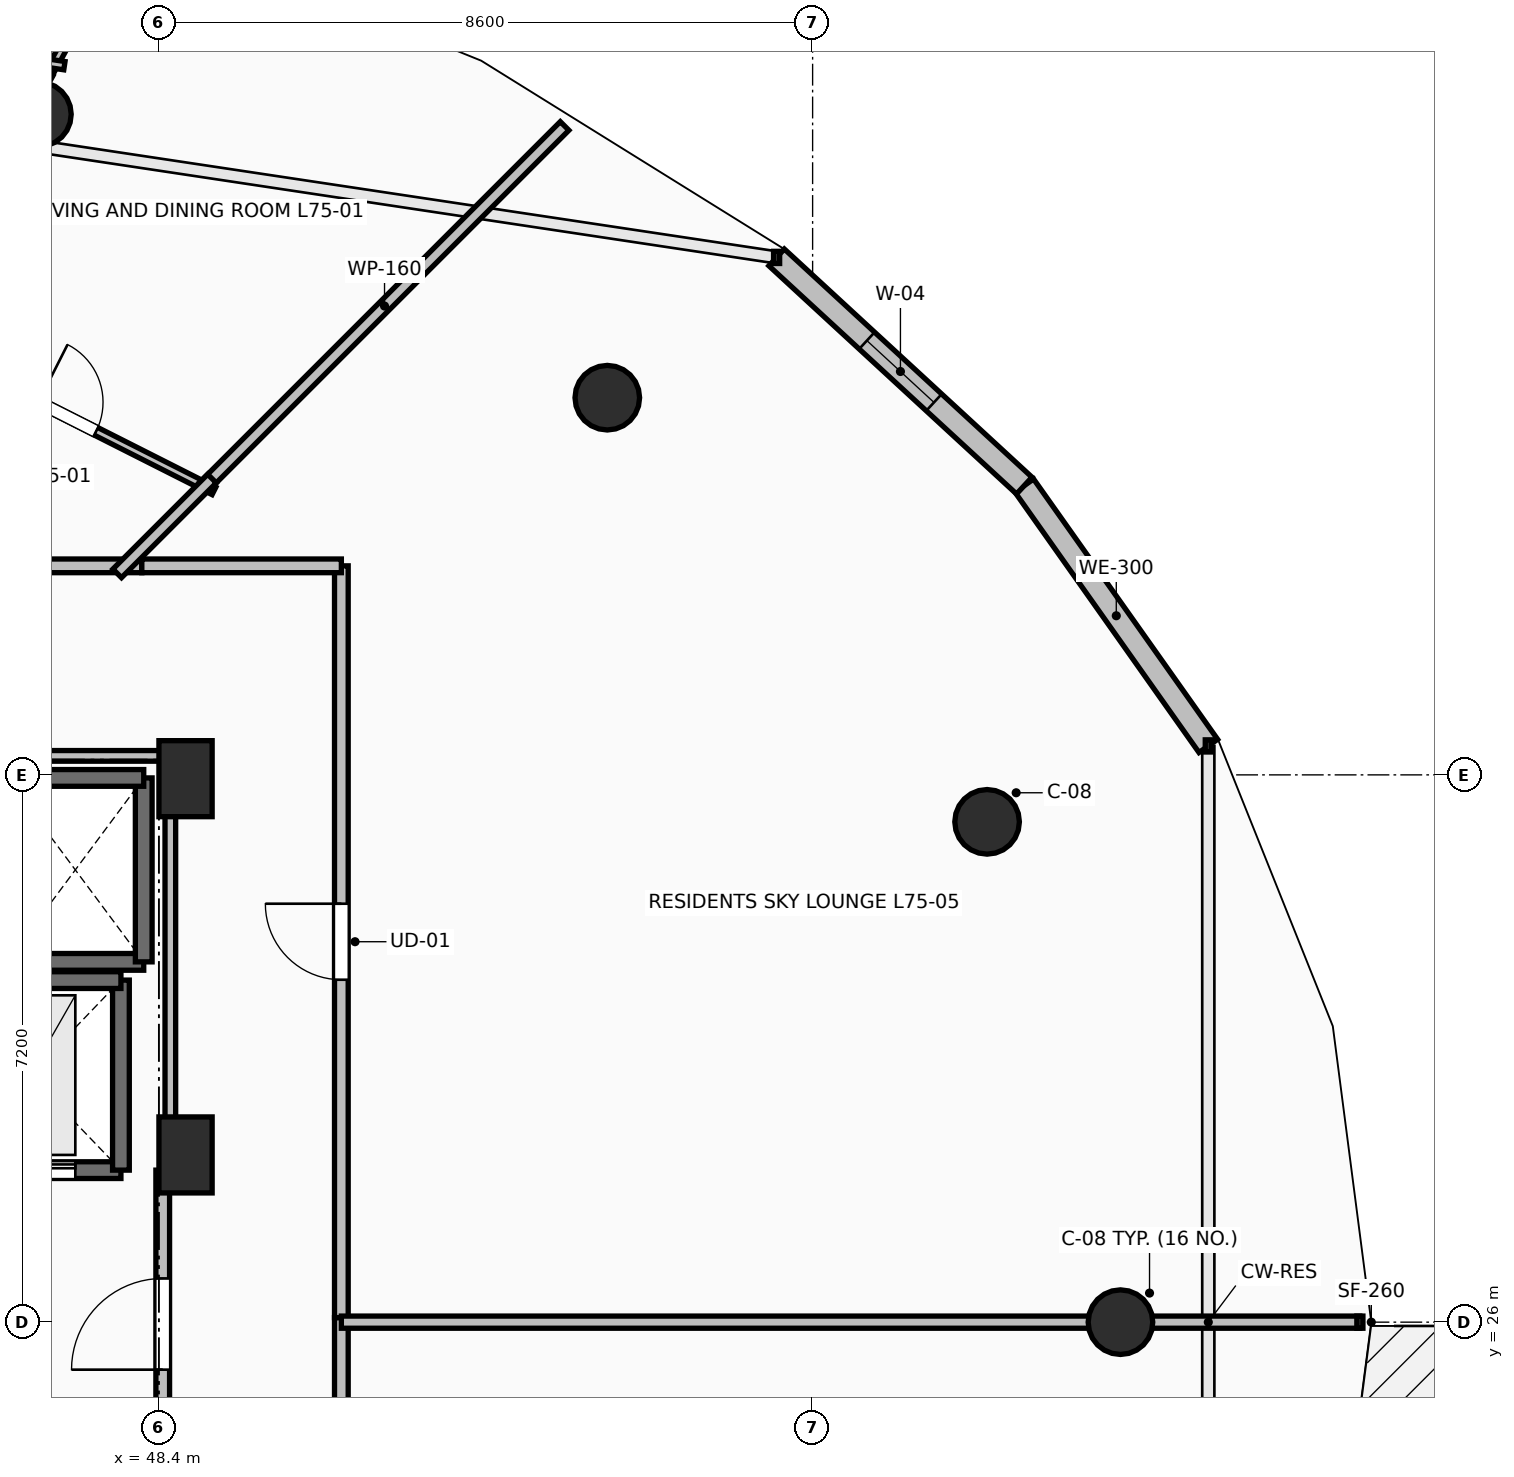
"""IFC4 building model, lengths in metres.
Left out: names, types, materials, properties, quantities, classifications, styles, units other than length and angle.
Written with IfcOpenShell. Run it as: python <this file> out.ifc"""

import sys

from ifc_helpers import new_model, si_unit, direction, frame, frame_2d, origin, origin_2d, place, context, subcontext, project, spatial, rectangle, circle, extrude, element, fill, save


model = new_model("IFC4")
c1 = context("Model", 3, precision=1e-05, world=origin(), true_north=direction((0.0, 1.0)))
c2 = subcontext(c1, "Body", "Model", "MODEL_VIEW")
j1 = project(units=[si_unit("LENGTHUNIT", "METRE"), si_unit("PLANEANGLEUNIT", "RADIAN")], contexts=[c1])
p1 = place(None, origin())
s1 = spatial("IfcSite", under=j1, at=p1, CompositionType="ELEMENT")
p2 = place(p1, origin())
s2 = spatial("IfcBuilding", under=s1, at=p2, CompositionType="ELEMENT")
p3 = place(p2, frame((0.0, 0.0, 276.85)))
s3 = spatial("IfcBuildingStorey", under=s2, at=p3, CompositionType="ELEMENT", Elevation=276.85)
for number, where, z_axis, x_axis in (
    (1, (61.05, 26.0, 0.0), (0.0, 0.0, 1.0), (1.0, 0.0, 0.0)),
    (2, (59.295, 32.582, 0.0), (0.0, 0.0, 1.0), (0.924, 0.383, 0.0)),
    (3, (54.299, 38.162, 0.0), (0.0, 0.0, 1.0), (0.707, 0.707, 0.0)),
    (4, (46.821, 41.891, 0.0), (0.0, 0.0, 1.0), (0.383, 0.924, 0.0)),
):
    element("IfcColumn", number, at=place(p3, frame(where, z_axis=z_axis, x_axis=x_axis)), inside=s3, PredefinedType="COLUMN", context=c2, shape_type="SweptSolid", body=[
        extrude(circle(Radius=0.425, at=origin_2d()), origin(), (0.0, 0.0, 1.0), 3.55),
    ])
for number, where, z_axis, x_axis in (
    (5, (48.75, 33.15, 0.0), (0.0, 0.0, 1.0), (1.0, 0.0, 0.0)),
    (6, (48.75, 28.2, 0.0), (0.0, 0.0, 1.0), (1.0, 0.0, 0.0)),
):
    element("IfcColumn", number, at=place(p3, frame(where, z_axis=z_axis, x_axis=x_axis)), inside=s3, PredefinedType="PILASTER", context=c2, shape_type="SweptSolid", body=[
        extrude(rectangle(XDim=0.7, YDim=1.0, at=origin_2d()), origin(), (0.0, 0.0, 1.0), 3.55),
    ])
p4 = place(p3, frame((62.206, 33.581, 0.0), z_axis=(0.0, 0.0, 1.0), x_axis=(-0.577261247247, 0.816559521668, 0.0)))
e7 = element("IfcWall", 7, at=p4, inside=s3, PredefinedType="STANDARD", context=c2, shape_type="SweptSolid", body=[
    extrude(rectangle(XDim=4.194, YDim=0.3, at=frame_2d((2.097, 0.0))), origin(), (0.0, 0.0, 1.0), 3.19),
])
p5 = place(p3, frame((59.784, 37.006, 0.0), z_axis=(0.0, 0.0, 1.0), x_axis=(-0.735445373611, 0.677584018727, 0.0)))
e8 = element("IfcWall", 8, at=p5, inside=s3, PredefinedType="STANDARD", context=c2, shape_type="SweptSolid", body=[
    extrude(rectangle(XDim=4.43, YDim=0.3, at=frame_2d((2.215, 0.0))), origin(), (0.0, 0.0, 1.0), 3.19),
])
p6 = place(p5, frame((1.615, 0.0, 0.85)))
e9 = element("IfcOpeningElement", 9, at=p6, cuts=e8, PredefinedType="OPENING", context=c2, shape_type="SweptSolid", body=[
    extrude(rectangle(XDim=1.2, YDim=2.1, at=frame_2d((0.6, 1.05))), frame((0.0, 0.165, 0.0), z_axis=(0.0, -1.0, 0.0), x_axis=(1.0, 0.0, 0.0)), (0.0, 0.0, 1.0), 0.33),
])
p7 = place(p3, frame((46.4, 30.74, 0.0), z_axis=(0.0, 0.0, 1.0), x_axis=(1.0, 0.0, 0.0)))
e10 = element("IfcWall", 10, at=p7, inside=s3, PredefinedType="SOLIDWALL", context=c2, shape_type="SweptSolid", body=[
    extrude(rectangle(XDim=1.8, YDim=0.22, at=frame_2d((0.9, 0.0))), origin(), (0.0, 0.0, 1.0), 3.19),
])
p8 = place(p3, frame((48.2, 30.74, 0.0), z_axis=(0.0, 0.0, 1.0), x_axis=(0.0, 1.0, 0.0)))
e11 = element("IfcWall", 11, at=p8, inside=s3, PredefinedType="SOLIDWALL", context=c2, shape_type="SweptSolid", body=[
    extrude(rectangle(XDim=2.42, YDim=0.22, at=frame_2d((1.21, 0.0))), origin(), (0.0, 0.0, 1.0), 3.19),
])
p9 = place(p3, frame((48.2, 33.16, 0.0), z_axis=(0.0, 0.0, 1.0), x_axis=(-1.0, 0.0, 0.0)))
e12 = element("IfcWall", 12, at=p9, inside=s3, PredefinedType="SOLIDWALL", context=c2, shape_type="SweptSolid", body=[
    extrude(rectangle(XDim=1.8, YDim=0.22, at=frame_2d((0.9, 0.0))), origin(), (0.0, 0.0, 1.0), 3.19),
])
p10 = place(p3, frame((45.5, 28.0, 0.0), z_axis=(0.0, 0.0, 1.0), x_axis=(1.0, 0.0, 0.0)))
e13 = element("IfcWall", 13, at=p10, inside=s3, PredefinedType="SHEAR", context=c2, shape_type="SweptSolid", body=[
    extrude(rectangle(XDim=2.4, YDim=0.22, at=frame_2d((1.2, 0.0))), origin(), (0.0, 0.0, 1.0), 3.19),
])
p11 = place(p10, frame((0.6, 0.0, 0.0)))
e14 = element("IfcOpeningElement", 14, at=p11, cuts=e13, PredefinedType="OPENING", context=c2, shape_type="SweptSolid", body=[
    extrude(rectangle(XDim=1.2, YDim=2.2, at=frame_2d((0.6, 1.1))), frame((0.0, 0.125, 0.0), z_axis=(0.0, -1.0, 0.0), x_axis=(1.0, 0.0, 0.0)), (0.0, 0.0, 1.0), 0.25),
])
p12 = place(p3, frame((47.9, 28.0, 0.0), z_axis=(0.0, 0.0, 1.0), x_axis=(0.0, 1.0, 0.0)))
e15 = element("IfcWall", 15, at=p12, inside=s3, PredefinedType="SHEAR", context=c2, shape_type="SweptSolid", body=[
    extrude(rectangle(XDim=2.5, YDim=0.22, at=frame_2d((1.25, 0.0))), origin(), (0.0, 0.0, 1.0), 3.19),
])
p13 = place(p3, frame((47.9, 30.5, 0.0), z_axis=(0.0, 0.0, 1.0), x_axis=(-1.0, 0.0, 0.0)))
e16 = element("IfcWall", 16, at=p13, inside=s3, PredefinedType="SHEAR", context=c2, shape_type="SweptSolid", body=[
    extrude(rectangle(XDim=2.4, YDim=0.22, at=frame_2d((1.2, 0.0))), origin(), (0.0, 0.0, 1.0), 3.19),
])
p14 = place(p3, frame((48.45, 23.95, 0.0), z_axis=(0.0, 0.0, 1.0), x_axis=(0.0, 1.0, 0.0)))
e17 = element("IfcWall", 17, at=p14, inside=s3, PredefinedType="PARTITIONING", context=c2, shape_type="SweptSolid", body=[
    extrude(rectangle(XDim=4.05, YDim=0.18, at=frame_2d((2.025, 0.0))), origin(), (0.0, 0.0, 1.0), 3.19),
])
p15 = place(p14, frame((1.425, 0.0, 0.0)))
e18 = element("IfcOpeningElement", 18, at=p15, cuts=e17, PredefinedType="OPENING", context=c2, shape_type="SweptSolid", body=[
    extrude(rectangle(XDim=1.2, YDim=2.15, at=frame_2d((0.6, 1.075))), frame((0.0, 0.105, 0.0), z_axis=(0.0, -1.0, 0.0), x_axis=(1.0, 0.0, 0.0)), (0.0, 0.0, 1.0), 0.21),
])
p16 = place(p3, frame((48.175, 35.95, 0.0), z_axis=(0.0, 0.0, 1.0), x_axis=(-1.0, 0.0, 0.0)))
e19 = element("IfcWall", 19, at=p16, inside=s3, PredefinedType="PARTITIONING", context=c2, shape_type="SweptSolid", body=[
    extrude(rectangle(XDim=4.512, YDim=0.18, at=frame_2d((2.256, 0.0))), origin(), (0.0, 0.0, 1.0), 2.382),
])
p17 = place(p3, frame((50.8, 14.05, 0.0), z_axis=(0.0, 0.0, 1.0), x_axis=(0.0, 1.0, 0.0)))
e20 = element("IfcWall", 20, at=p17, inside=s3, PredefinedType="PARTITIONING", context=c2, shape_type="SweptSolid", body=[
    extrude(rectangle(XDim=12.01, YDim=0.18, at=frame_2d((6.005, 0.0))), origin(), (0.0, 0.0, 1.0), 2.382),
])
p18 = place(p17, frame((5.505, 0.0, 0.0)))
e21 = element("IfcOpeningElement", 21, at=p18, cuts=e20, PredefinedType="OPENING", context=c2, shape_type="SweptSolid", body=[
    extrude(rectangle(XDim=1.0, YDim=2.15, at=frame_2d((0.5, 1.075))), frame((0.0, 0.105, 0.0), z_axis=(0.0, -1.0, 0.0), x_axis=(1.0, 0.0, 0.0)), (0.0, 0.0, 1.0), 0.21),
])
p19 = place(p3, frame((50.8, 26.06, 0.0), z_axis=(0.0, 0.0, 1.0), x_axis=(0.0, 1.0, 0.0)))
e22 = element("IfcWall", 22, at=p19, inside=s3, PredefinedType="PARTITIONING", context=c2, shape_type="SweptSolid", body=[
    extrude(rectangle(XDim=9.89, YDim=0.18, at=frame_2d((4.945, 0.0))), origin(), (0.0, 0.0, 1.0), 2.382),
])
p20 = place(p19, frame((4.445, 0.0, 0.0)))
e23 = element("IfcOpeningElement", 23, at=p20, cuts=e22, PredefinedType="OPENING", context=c2, shape_type="SweptSolid", body=[
    extrude(rectangle(XDim=1.0, YDim=2.15, at=frame_2d((0.5, 1.075))), frame((0.0, 0.105, 0.0), z_axis=(0.0, -1.0, 0.0), x_axis=(1.0, 0.0, 0.0)), (0.0, 0.0, 1.0), 0.21),
])
p21 = place(p3, frame((50.8, 35.95, 0.0), z_axis=(0.0, 0.0, 1.0), x_axis=(-1.0, 0.0, 0.0)))
e24 = element("IfcWall", 24, at=p21, inside=s3, PredefinedType="PARTITIONING", context=c2, shape_type="SweptSolid", body=[
    extrude(rectangle(XDim=2.625, YDim=0.18, at=frame_2d((1.312, 0.0))), origin(), (0.0, 0.0, 1.0), 2.382),
])
p22 = place(p3, frame((45.264, 38.886, 0.0), z_axis=(0.0, 0.0, 1.0), x_axis=(0.892556527512, -0.450935522216, 0.0)))
e25 = element("IfcWall", 25, at=p22, inside=s3, PredefinedType="PARTITIONING", context=c2, shape_type="SweptSolid", body=[
    extrude(rectangle(XDim=4.325, YDim=0.11, at=frame_2d((2.162, 0.0))), origin(), (0.0, 0.0, 1.0), 2.382),
])
p23 = place(p22, frame((1.737, 0.0, 0.0)))
e26 = element("IfcOpeningElement", 26, at=p23, cuts=e25, PredefinedType="OPENING", context=c2, shape_type="SweptSolid", body=[
    extrude(rectangle(XDim=0.85, YDim=2.1, at=frame_2d((0.425, 1.05))), frame((0.0, 0.07, 0.0), z_axis=(0.0, -1.0, 0.0), x_axis=(1.0, 0.0, 0.0)), (0.0, 0.0, 1.0), 0.14),
])
p24 = place(p3, frame((48.044, 44.434, 0.0), z_axis=(0.0, 0.0, 1.0), x_axis=(-0.478485169604, -0.878095634011, 0.0)))
e27 = element("IfcWall", 27, at=p24, inside=s3, PredefinedType="PARTITIONING", context=c2, shape_type="SweptSolid", body=[
    extrude(rectangle(XDim=2.284, YDim=0.11, at=frame_2d((1.142, 0.0))), origin(), (0.0, 0.0, 1.0), 3.19),
])
p25 = place(p24, frame((0.692, 0.0, 0.0)))
e28 = element("IfcOpeningElement", 28, at=p25, cuts=e27, PredefinedType="OPENING", context=c2, shape_type="SweptSolid", body=[
    extrude(rectangle(XDim=0.9, YDim=2.1, at=frame_2d((0.45, 1.05))), frame((0.0, 0.07, 0.0), z_axis=(0.0, -1.0, 0.0), x_axis=(1.0, 0.0, 0.0)), (0.0, 0.0, 1.0), 0.14),
])
p26 = place(p3, frame((46.951, 42.428, 0.0), z_axis=(0.0, 0.0, 1.0), x_axis=(-0.478536562944, -0.878067627194, 0.0)))
e29 = element("IfcWall", 29, at=p26, inside=s3, PredefinedType="PARTITIONING", context=c2, shape_type="SweptSolid", body=[
    extrude(rectangle(XDim=1.897, YDim=0.125, at=frame_2d((0.949, 0.0))), origin(), (0.0, 0.0, 1.0), 3.19),
])
p27 = place(p3, frame((48.999, 36.999, 0.0), z_axis=(0.0, 0.0, 1.0), x_axis=(0.707106781187, 0.707106781187, 0.0)))
e30 = element("IfcWall", 30, at=p27, inside=s3, PredefinedType="PARTITIONING", context=c2, shape_type="SweptSolid", body=[
    extrude(rectangle(XDim=6.701, YDim=0.16, at=frame_2d((3.35, 0.0))), origin(), (0.0, 0.0, 1.0), 2.774),
])
p28 = place(p3, frame((47.851, 35.851, 0.0), z_axis=(0.0, 0.0, 1.0), x_axis=(0.707106781187, 0.707106781187, 0.0)))
e31 = element("IfcWall", 31, at=p28, inside=s3, PredefinedType="PARTITIONING", context=c2, shape_type="SweptSolid", body=[
    extrude(rectangle(XDim=1.763, YDim=0.16, at=frame_2d((0.882, 0.0))), origin(), (0.0, 0.0, 1.0), 2.382),
])
p29 = place(p3, frame((41.183, 43.429, 0.0), z_axis=(0.0, 0.0, 1.0), x_axis=(0.988879067965, -0.148721850918, 0.0)))
e32 = element("IfcWall", 32, at=p29, inside=s3, PredefinedType="PARTITIONING", context=c2, shape_type="SweptSolid", body=[
    extrude(rectangle(XDim=6.041, YDim=0.11, at=frame_2d((3.021, 0.0))), origin(), (0.0, 0.0, 1.0), 3.19),
])
p30 = place(p3, frame((64.199, 26.0, 0.0), z_axis=(0.0, 0.0, 1.0), x_axis=(-1.0, 0.0, 0.0)))
e33 = element("IfcWall", 33, at=p30, inside=s3, PredefinedType="PARTITIONING", context=c2, shape_type="SweptSolid", body=[
    extrude(rectangle(XDim=13.399, YDim=0.16, at=frame_2d((6.699, 0.0))), origin(), (0.0, 0.0, 1.0), 2.382),
])
p31 = place(p3, frame((48.55, 28.196, 0.0), z_axis=(0.0, 0.0, 1.0), x_axis=(0.0, 1.0, 0.0)))
e34 = element("IfcWall", 34, at=p31, inside=s3, PredefinedType="PARTITIONING", context=c2, shape_type="SweptSolid", body=[
    extrude(rectangle(XDim=5.254, YDim=0.14, at=frame_2d((2.627, 0.0))), origin(), (0.0, 0.0, 1.0), 2.382),
])
p32 = place(p3, frame((48.55, 33.45, 0.0), z_axis=(0.0, 0.0, 1.0), x_axis=(-1.0, 0.0, 0.0)))
e35 = element("IfcWall", 35, at=p32, inside=s3, PredefinedType="PARTITIONING", context=c2, shape_type="SweptSolid", body=[
    extrude(rectangle(XDim=4.21, YDim=0.14, at=frame_2d((2.105, 0.0))), origin(), (0.0, 0.0, 1.0), 2.382),
])
p33 = place(p6, origin())
e36 = element("IfcWindow", 36, at=p33, inside=s3, PartitioningType="SINGLE_PANEL", PredefinedType="WINDOW", context=c2, shape_type="SweptSolid", body=[
    extrude(rectangle(XDim=1.2, YDim=2.1, at=frame_2d((0.6, 1.05))), frame((0.0, 0.03, 0.0), z_axis=(0.0, -1.0, 0.0), x_axis=(1.0, 0.0, 0.0)), (0.0, 0.0, 1.0), 0.06),
])
fill(e9, e36)
p34 = place(p11, origin())
e37 = element("IfcDoor", 37, at=p34, inside=s3, OperationType="SLIDING_TO_LEFT", PredefinedType="DOOR", context=c2, shape_type="SweptSolid", body=[
    extrude(rectangle(XDim=1.2, YDim=2.2, at=frame_2d((0.6, 1.1))), frame((0.0, 0.025, 0.0), z_axis=(0.0, -1.0, 0.0), x_axis=(1.0, 0.0, 0.0)), (0.0, 0.0, 1.0), 0.05),
])
fill(e14, e37)
p35 = place(p15, origin())
e38 = element("IfcDoor", 38, at=p35, inside=s3, OperationType="SINGLE_SWING_LEFT", PredefinedType="DOOR", context=c2, shape_type="SweptSolid", body=[
    extrude(rectangle(XDim=1.2, YDim=2.15, at=frame_2d((0.6, 1.075))), frame((0.0, 0.025, 0.0), z_axis=(0.0, -1.0, 0.0), x_axis=(1.0, 0.0, 0.0)), (0.0, 0.0, 1.0), 0.05),
])
fill(e18, e38)
p36 = place(p20, origin())
e39 = element("IfcDoor", 39, at=p36, inside=s3, OperationType="SINGLE_SWING_RIGHT", PredefinedType="DOOR", context=c2, shape_type="SweptSolid", body=[
    extrude(rectangle(XDim=1.0, YDim=2.15, at=frame_2d((0.5, 1.075))), frame((0.0, 0.025, 0.0), z_axis=(0.0, -1.0, 0.0), x_axis=(1.0, 0.0, 0.0)), (0.0, 0.0, 1.0), 0.05),
])
fill(e23, e39)
p37 = place(p23, origin())
e40 = element("IfcDoor", 40, at=p37, inside=s3, OperationType="SINGLE_SWING_LEFT", PredefinedType="DOOR", context=c2, shape_type="SweptSolid", body=[
    extrude(rectangle(XDim=0.85, YDim=2.1, at=frame_2d((0.425, 1.05))), frame((0.0, 0.025, 0.0), z_axis=(0.0, -1.0, 0.0), x_axis=(1.0, 0.0, 0.0)), (0.0, 0.0, 1.0), 0.05),
])
fill(e26, e40)
save(model, sys.argv[1])
